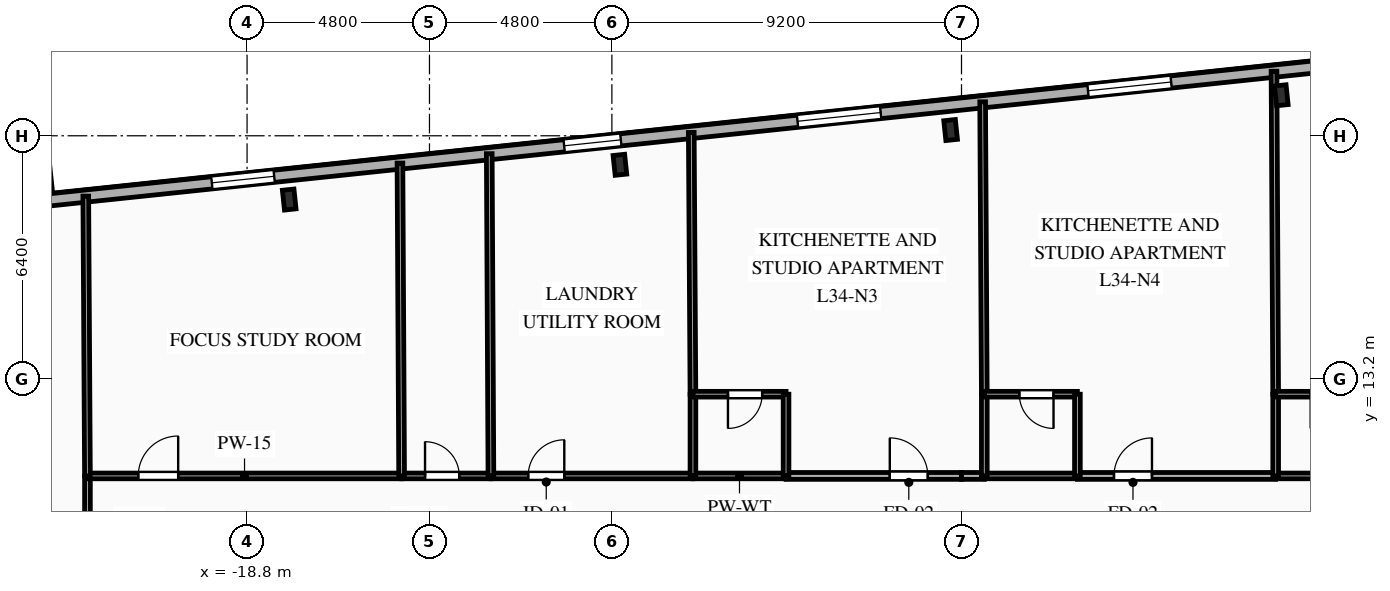
"""IFC4 building model, lengths in metres.
Left out: names, types, materials, properties, quantities, classifications, styles, units other than length and angle.
Written with IfcOpenShell. Run it as: python <this file> out.ifc"""

import sys

from ifc_helpers import new_model, si_unit, direction, frame, frame_2d, origin, origin_2d, place, context, subcontext, project, spatial, rectangle, i_section, extrude, element, fill, save


model = new_model("IFC4")
c1 = context("Model", 3, precision=1e-05, world=origin(), true_north=direction((0.0, 1.0)))
c2 = subcontext(c1, "Body", "Model", "MODEL_VIEW")
j1 = project(units=[si_unit("LENGTHUNIT", "METRE"), si_unit("PLANEANGLEUNIT", "RADIAN")], contexts=[c1])
p1 = place(None, origin())
s1 = spatial("IfcSite", under=j1, at=p1, CompositionType="ELEMENT")
p2 = place(p1, origin())
s2 = spatial("IfcBuilding", under=s1, at=p2, CompositionType="ELEMENT")
p3 = place(p2, frame((0.0, 0.0, 122.55)))
s3 = spatial("IfcBuildingStorey", under=s2, at=p3, CompositionType="ELEMENT", Elevation=122.55)
for number, where, z_axis, x_axis in (
    (1, (8.415, 20.666, 0.0), (0.0, 0.0, 1.0), (0.995, 0.105, 0.0)),
    (2, (-0.287, 19.751, 0.0), (0.0, 0.0, 1.0), (0.995, 0.105, 0.0)),
    (3, (-8.989, 18.836, 0.0), (0.0, 0.0, 1.0), (0.995, 0.105, 0.0)),
    (4, (-17.691, 17.922, 0.0), (0.0, 0.0, 1.0), (0.995, 0.105, 0.0)),
):
    element("IfcColumn", number, at=place(p3, frame(where, z_axis=z_axis, x_axis=x_axis)), inside=s3, PredefinedType="COLUMN", context=c2, shape_type="SweptSolid", body=[
        extrude(i_section(OverallWidth=0.306, OverallDepth=0.524, WebThickness=0.021, FlangeThickness=0.04, FilletRadius=0.027, at=origin_2d()), origin(), (0.0, 0.0, 1.0), 3.35),
    ])
p4 = place(p3, frame((-27.107, 17.586, 0.0), z_axis=(0.0, 0.0, 1.0), x_axis=(0.994521628355, 0.104531003701, 0.0)))
e5 = element("IfcWall", 5, at=p4, inside=s3, PredefinedType="SOLIDWALL", context=c2, shape_type="SweptSolid", body=[
    extrude(rectangle(XDim=53.8, YDim=0.32, at=frame_2d((26.9, 0.0))), origin(), (0.0, 0.0, 1.0), 3.0),
])
p5 = place(p4, frame((1.457, 0.0, 0.85)))
e6 = element("IfcOpeningElement", 6, at=p5, cuts=e5, PredefinedType="OPENING", context=c2, shape_type="SweptSolid", body=[
    extrude(rectangle(XDim=1.65, YDim=1.85, at=frame_2d((0.825, 0.925))), frame((0.0, 0.17, 0.0), z_axis=(0.0, -1.0, 0.0), x_axis=(1.0, 0.0, 0.0)), (0.0, 0.0, 1.0), 0.34),
])
p6 = place(p4, frame((7.421, 0.0, 0.85)))
e7 = element("IfcOpeningElement", 7, at=p6, cuts=e5, PredefinedType="OPENING", context=c2, shape_type="SweptSolid", body=[
    extrude(rectangle(XDim=1.65, YDim=1.85, at=frame_2d((0.825, 0.925))), frame((0.0, 0.17, 0.0), z_axis=(0.0, -1.0, 0.0), x_axis=(1.0, 0.0, 0.0)), (0.0, 0.0, 1.0), 0.34),
])
p7 = place(p4, frame((16.743, 0.0, 0.85)))
e8 = element("IfcOpeningElement", 8, at=p7, cuts=e5, PredefinedType="OPENING", context=c2, shape_type="SweptSolid", body=[
    extrude(rectangle(XDim=1.5, YDim=1.85, at=frame_2d((0.75, 0.925))), frame((0.0, 0.17, 0.0), z_axis=(0.0, -1.0, 0.0), x_axis=(1.0, 0.0, 0.0)), (0.0, 0.0, 1.0), 0.34),
])
p8 = place(p4, frame((22.918, 0.0, 0.85)))
e9 = element("IfcOpeningElement", 9, at=p8, cuts=e5, PredefinedType="OPENING", context=c2, shape_type="SweptSolid", body=[
    extrude(rectangle(XDim=2.2, YDim=1.85, at=frame_2d((1.1, 0.925))), frame((0.0, 0.17, 0.0), z_axis=(0.0, -1.0, 0.0), x_axis=(1.0, 0.0, 0.0)), (0.0, 0.0, 1.0), 0.34),
])
p9 = place(p4, frame((30.604, 0.0, 0.85)))
e10 = element("IfcOpeningElement", 10, at=p9, cuts=e5, PredefinedType="OPENING", context=c2, shape_type="SweptSolid", body=[
    extrude(rectangle(XDim=2.2, YDim=1.85, at=frame_2d((1.1, 0.925))), frame((0.0, 0.17, 0.0), z_axis=(0.0, -1.0, 0.0), x_axis=(1.0, 0.0, 0.0)), (0.0, 0.0, 1.0), 0.34),
])
p10 = place(p4, frame((38.289, 0.0, 0.85)))
e11 = element("IfcOpeningElement", 11, at=p10, cuts=e5, PredefinedType="OPENING", context=c2, shape_type="SweptSolid", body=[
    extrude(rectangle(XDim=2.2, YDim=1.85, at=frame_2d((1.1, 0.925))), frame((0.0, 0.17, 0.0), z_axis=(0.0, -1.0, 0.0), x_axis=(1.0, 0.0, 0.0)), (0.0, 0.0, 1.0), 0.34),
])
p11 = place(p4, frame((44.208, 0.0, 0.85)))
e12 = element("IfcOpeningElement", 12, at=p11, cuts=e5, PredefinedType="OPENING", context=c2, shape_type="SweptSolid", body=[
    extrude(rectangle(XDim=1.65, YDim=1.85, at=frame_2d((0.825, 0.925))), frame((0.0, 0.17, 0.0), z_axis=(0.0, -1.0, 0.0), x_axis=(1.0, 0.0, 0.0)), (0.0, 0.0, 1.0), 0.34),
])
p12 = place(p4, frame((47.771, 0.0, 0.85)))
e13 = element("IfcOpeningElement", 13, at=p12, cuts=e5, PredefinedType="OPENING", context=c2, shape_type="SweptSolid", body=[
    extrude(rectangle(XDim=1.65, YDim=1.85, at=frame_2d((0.825, 0.925))), frame((0.0, 0.17, 0.0), z_axis=(0.0, -1.0, 0.0), x_axis=(1.0, 0.0, 0.0)), (0.0, 0.0, 1.0), 0.34),
])
p13 = place(p4, frame((51.129, 0.0, 0.85)))
e14 = element("IfcOpeningElement", 14, at=p13, cuts=e5, PredefinedType="OPENING", context=c2, shape_type="SweptSolid", body=[
    extrude(rectangle(XDim=1.5, YDim=1.85, at=frame_2d((0.75, 0.925))), frame((0.0, 0.17, 0.0), z_axis=(0.0, -1.0, 0.0), x_axis=(1.0, 0.0, 0.0)), (0.0, 0.0, 1.0), 0.34),
])
p14 = place(p3, frame((-23.0, 8.5, 0.0), z_axis=(0.0, 0.0, 1.0), x_axis=(0.0, 1.0, 0.0)))
e15 = element("IfcWall", 15, at=p14, inside=s3, PredefinedType="PARTITIONING", context=c2, shape_type="SweptSolid", body=[
    extrude(rectangle(XDim=2.15, YDim=0.15, at=frame_2d((1.075, 0.0))), origin(), (0.0, 0.0, 1.0), 3.0),
])
p15 = place(p3, frame((-23.0, 10.65, 0.0), z_axis=(0.0, 0.0, 1.0), x_axis=(1.0, 0.0, 0.0)))
e16 = element("IfcWall", 16, at=p15, inside=s3, PredefinedType="PARTITIONING", context=c2, shape_type="SweptSolid", body=[
    extrude(rectangle(XDim=8.267, YDim=0.15, at=frame_2d((4.134, 0.0))), origin(), (0.0, 0.0, 1.0), 3.0),
])
p16 = place(p15, frame((1.337, 0.0, 0.0)))
e17 = element("IfcOpeningElement", 17, at=p16, cuts=e16, PredefinedType="OPENING", context=c2, shape_type="SweptSolid", body=[
    extrude(rectangle(XDim=1.05, YDim=2.15, at=frame_2d((0.525, 1.075))), frame((0.0, 0.085, 0.0), z_axis=(0.0, -1.0, 0.0), x_axis=(1.0, 0.0, 0.0)), (0.0, 0.0, 1.0), 0.17),
])
p17 = place(p3, frame((-14.733, 10.65, 0.0), z_axis=(0.0, 0.0, 1.0), x_axis=(1.0, 0.0, 0.0)))
e18 = element("IfcWall", 18, at=p17, inside=s3, PredefinedType="PLUMBINGWALL", context=c2, shape_type="SweptSolid", body=[
    extrude(rectangle(XDim=2.35, YDim=0.15, at=frame_2d((1.175, 0.0))), origin(), (0.0, 0.0, 1.0), 3.0),
])
p18 = place(p17, frame((0.616, 0.0, 0.0)))
e19 = element("IfcOpeningElement", 19, at=p18, cuts=e18, PredefinedType="OPENING", context=c2, shape_type="SweptSolid", body=[
    extrude(rectangle(XDim=0.9, YDim=2.1, at=frame_2d((0.45, 1.05))), frame((0.0, 0.085, 0.0), z_axis=(0.0, -1.0, 0.0), x_axis=(1.0, 0.0, 0.0)), (0.0, 0.0, 1.0), 0.17),
])
p19 = place(p3, frame((-12.383, 10.65, 0.0), z_axis=(0.0, 0.0, 1.0), x_axis=(1.0, 0.0, 0.0)))
e20 = element("IfcWall", 20, at=p19, inside=s3, PredefinedType="PARTITIONING", context=c2, shape_type="SweptSolid", body=[
    extrude(rectangle(XDim=5.316, YDim=0.15, at=frame_2d((2.658, 0.0))), origin(), (0.0, 0.0, 1.0), 3.0),
])
p20 = place(p19, frame((0.981, 0.0, 0.0)))
e21 = element("IfcOpeningElement", 21, at=p20, cuts=e20, PredefinedType="OPENING", context=c2, shape_type="SweptSolid", body=[
    extrude(rectangle(XDim=0.95, YDim=2.1, at=frame_2d((0.475, 1.05))), frame((0.0, 0.085, 0.0), z_axis=(0.0, -1.0, 0.0), x_axis=(1.0, 0.0, 0.0)), (0.0, 0.0, 1.0), 0.17),
])
p21 = place(p3, frame((-4.617, 10.65, 0.0), z_axis=(0.0, 0.0, 1.0), x_axis=(1.0, 0.0, 0.0)))
e22 = element("IfcWall", 22, at=p21, inside=s3, PredefinedType="PARTITIONING", context=c2, shape_type="SweptSolid", body=[
    extrude(rectangle(XDim=4.617, YDim=0.18, at=frame_2d((2.309, 0.0))), origin(), (0.0, 0.0, 1.0), 3.0),
])
p22 = place(p21, frame((2.73, 0.0, 0.0)))
e23 = element("IfcOpeningElement", 23, at=p22, cuts=e22, PredefinedType="OPENING", context=c2, shape_type="SweptSolid", body=[
    extrude(rectangle(XDim=1.0, YDim=2.15, at=frame_2d((0.5, 1.075))), frame((0.0, 0.1, 0.0), z_axis=(0.0, -1.0, 0.0), x_axis=(1.0, 0.0, 0.0)), (0.0, 0.0, 1.0), 0.2),
])
p23 = place(p3, frame((-7.067, 10.65, 0.0), z_axis=(0.0, 0.0, 1.0), x_axis=(1.0, 0.0, 0.0)))
e24 = element("IfcWall", 24, at=p23, inside=s3, PredefinedType="PLUMBINGWALL", context=c2, shape_type="SweptSolid", body=[
    extrude(rectangle(XDim=2.45, YDim=0.15, at=frame_2d((1.225, 0.0))), origin(), (0.0, 0.0, 1.0), 3.0),
])
p24 = place(p3, frame((0.0, 10.65, 0.0), z_axis=(0.0, 0.0, 1.0), x_axis=(1.0, 0.0, 0.0)))
e25 = element("IfcWall", 25, at=p24, inside=s3, PredefinedType="PARTITIONING", context=c2, shape_type="SweptSolid", body=[
    extrude(rectangle(XDim=0.6, YDim=0.18, at=frame_2d((0.3, 0.0))), origin(), (0.0, 0.0, 1.0), 3.0),
])
p25 = place(p3, frame((3.05, 10.65, 0.0), z_axis=(0.0, 0.0, 1.0), x_axis=(1.0, 0.0, 0.0)))
e26 = element("IfcWall", 26, at=p25, inside=s3, PredefinedType="PARTITIONING", context=c2, shape_type="SweptSolid", body=[
    extrude(rectangle(XDim=5.217, YDim=0.18, at=frame_2d((2.608, 0.0))), origin(), (0.0, 0.0, 1.0), 3.0),
])
p26 = place(p25, frame((0.962, 0.0, 0.0)))
e27 = element("IfcOpeningElement", 27, at=p26, cuts=e26, PredefinedType="OPENING", context=c2, shape_type="SweptSolid", body=[
    extrude(rectangle(XDim=1.0, YDim=2.15, at=frame_2d((0.5, 1.075))), frame((0.0, 0.1, 0.0), z_axis=(0.0, -1.0, 0.0), x_axis=(1.0, 0.0, 0.0)), (0.0, 0.0, 1.0), 0.2),
])
for number, where, z_axis, x_axis in (
    (28, (0.6, 10.65, 0.0), (0.0, 0.0, 1.0), (1.0, 0.0, 0.0)),
    (29, (8.267, 10.65, 0.0), (0.0, 0.0, 1.0), (1.0, 0.0, 0.0)),
):
    element("IfcWall", number, at=place(p3, frame(where, z_axis=z_axis, x_axis=x_axis)), inside=s3, PredefinedType="PLUMBINGWALL", context=c2, shape_type="SweptSolid", body=[
        extrude(rectangle(XDim=2.45, YDim=0.15, at=frame_2d((1.225, 0.0))), origin(), (0.0, 0.0, 1.0), 3.0),
    ])
p27 = place(p3, frame((-23.044, 18.013, 0.0), z_axis=(0.0, 0.0, 1.0), x_axis=(0.005968459246, -0.999982188588, 0.0)))
e30 = element("IfcWall", 30, at=p27, inside=s3, PredefinedType="PARTITIONING", context=c2, shape_type="SweptSolid", body=[
    extrude(rectangle(XDim=7.363, YDim=0.15, at=frame_2d((3.682, 0.0))), origin(), (0.0, 0.0, 1.0), 3.0),
])
p28 = place(p3, frame((-14.777, 18.882, 0.0), z_axis=(0.0, 0.0, 1.0), x_axis=(0.005338477179, -0.999985750229, 0.0)))
e31 = element("IfcWall", 31, at=p28, inside=s3, PredefinedType="PLUMBINGWALL", context=c2, shape_type="SweptSolid", body=[
    extrude(rectangle(XDim=8.232, YDim=0.15, at=frame_2d((4.116, 0.0))), origin(), (0.0, 0.0, 1.0), 3.0),
])
p29 = place(p3, frame((-12.427, 19.129, 0.0), z_axis=(0.0, 0.0, 1.0), x_axis=(0.005182918666, -0.999986568587, 0.0)))
e32 = element("IfcWall", 32, at=p29, inside=s3, PredefinedType="PLUMBINGWALL", context=c2, shape_type="SweptSolid", body=[
    extrude(rectangle(XDim=8.479, YDim=0.15, at=frame_2d((4.239, 0.0))), origin(), (0.0, 0.0, 1.0), 3.0),
])
p30 = place(p3, frame((-7.111, 19.688, 0.0), z_axis=(0.0, 0.0, 1.0), x_axis=(0.006380360007, -0.999979645296, 0.0)))
e33 = element("IfcWall", 33, at=p30, inside=s3, PredefinedType="PARTITIONING", context=c2, shape_type="SweptSolid", body=[
    extrude(rectangle(XDim=6.888, YDim=0.15, at=frame_2d((3.444, 0.0))), origin(), (0.0, 0.0, 1.0), 3.0),
])
p31 = place(p3, frame((-7.067, 12.8, 0.0), z_axis=(0.0, 0.0, 1.0), x_axis=(0.0, -1.0, 0.0)))
e34 = element("IfcWall", 34, at=p31, inside=s3, PredefinedType="PLUMBINGWALL", context=c2, shape_type="SweptSolid", body=[
    extrude(rectangle(XDim=2.15, YDim=0.15, at=frame_2d((1.075, 0.0))), origin(), (0.0, 0.0, 1.0), 3.0),
])
p32 = place(p3, frame((-4.617, 12.8, 0.0), z_axis=(0.0, 0.0, 1.0), x_axis=(-1.0, 0.0, 0.0)))
e35 = element("IfcWall", 35, at=p32, inside=s3, PredefinedType="PLUMBINGWALL", context=c2, shape_type="SweptSolid", body=[
    extrude(rectangle(XDim=2.45, YDim=0.15, at=frame_2d((1.225, 0.0))), origin(), (0.0, 0.0, 1.0), 3.0),
])
p33 = place(p32, frame((0.629, 0.0, 0.0)))
e36 = element("IfcOpeningElement", 36, at=p33, cuts=e35, PredefinedType="OPENING", context=c2, shape_type="SweptSolid", body=[
    extrude(rectangle(XDim=0.9, YDim=2.1, at=frame_2d((0.45, 1.05))), frame((0.0, 0.085, 0.0), z_axis=(0.0, -1.0, 0.0), x_axis=(1.0, 0.0, 0.0)), (0.0, 0.0, 1.0), 0.17),
])
p34 = place(p3, frame((-4.617, 10.65, 0.0), z_axis=(0.0, 0.0, 1.0), x_axis=(0.0, 1.0, 0.0)))
e37 = element("IfcWall", 37, at=p34, inside=s3, PredefinedType="PLUMBINGWALL", context=c2, shape_type="SweptSolid", body=[
    extrude(rectangle(XDim=2.15, YDim=0.15, at=frame_2d((1.075, 0.0))), origin(), (0.0, 0.0, 1.0), 3.0),
])
p35 = place(p3, frame((0.556, 20.493, 0.0), z_axis=(0.0, 0.0, 1.0), x_axis=(0.005712016487, -0.999983686301, 0.0)))
e38 = element("IfcWall", 38, at=p35, inside=s3, PredefinedType="PARTITIONING", context=c2, shape_type="SweptSolid", body=[
    extrude(rectangle(XDim=7.694, YDim=0.15, at=frame_2d((3.847, 0.0))), origin(), (0.0, 0.0, 1.0), 3.0),
])
p36 = place(p3, frame((0.6, 12.8, 0.0), z_axis=(0.0, 0.0, 1.0), x_axis=(0.0, -1.0, 0.0)))
e39 = element("IfcWall", 39, at=p36, inside=s3, PredefinedType="PLUMBINGWALL", context=c2, shape_type="SweptSolid", body=[
    extrude(rectangle(XDim=2.15, YDim=0.15, at=frame_2d((1.075, 0.0))), origin(), (0.0, 0.0, 1.0), 3.0),
])
p37 = place(p3, frame((3.05, 12.8, 0.0), z_axis=(0.0, 0.0, 1.0), x_axis=(-1.0, 0.0, 0.0)))
e40 = element("IfcWall", 40, at=p37, inside=s3, PredefinedType="PLUMBINGWALL", context=c2, shape_type="SweptSolid", body=[
    extrude(rectangle(XDim=2.45, YDim=0.15, at=frame_2d((1.225, 0.0))), origin(), (0.0, 0.0, 1.0), 3.0),
])
p38 = place(p37, frame((0.629, 0.0, 0.0)))
e41 = element("IfcOpeningElement", 41, at=p38, cuts=e40, PredefinedType="OPENING", context=c2, shape_type="SweptSolid", body=[
    extrude(rectangle(XDim=0.9, YDim=2.1, at=frame_2d((0.45, 1.05))), frame((0.0, 0.085, 0.0), z_axis=(0.0, -1.0, 0.0), x_axis=(1.0, 0.0, 0.0)), (0.0, 0.0, 1.0), 0.17),
])
p39 = place(p3, frame((3.05, 10.65, 0.0), z_axis=(0.0, 0.0, 1.0), x_axis=(0.0, 1.0, 0.0)))
e42 = element("IfcWall", 42, at=p39, inside=s3, PredefinedType="PLUMBINGWALL", context=c2, shape_type="SweptSolid", body=[
    extrude(rectangle(XDim=2.15, YDim=0.15, at=frame_2d((1.075, 0.0))), origin(), (0.0, 0.0, 1.0), 3.0),
])
p40 = place(p3, frame((8.223, 21.299, 0.0), z_axis=(0.0, 0.0, 1.0), x_axis=(0.005170561699, -0.999986632557, 0.0)))
e43 = element("IfcWall", 43, at=p40, inside=s3, PredefinedType="PARTITIONING", context=c2, shape_type="SweptSolid", body=[
    extrude(rectangle(XDim=8.499, YDim=0.15, at=frame_2d((4.25, 0.0))), origin(), (0.0, 0.0, 1.0), 2.485),
])
p41 = place(p3, frame((8.267, 12.8, 0.0), z_axis=(0.0, 0.0, 1.0), x_axis=(0.0, -1.0, 0.0)))
e44 = element("IfcWall", 44, at=p41, inside=s3, PredefinedType="PLUMBINGWALL", context=c2, shape_type="SweptSolid", body=[
    extrude(rectangle(XDim=2.15, YDim=0.15, at=frame_2d((1.075, 0.0))), origin(), (0.0, 0.0, 1.0), 3.0),
])
p42 = place(p3, frame((10.717, 12.8, 0.0), z_axis=(0.0, 0.0, 1.0), x_axis=(-1.0, 0.0, 0.0)))
e45 = element("IfcWall", 45, at=p42, inside=s3, PredefinedType="PLUMBINGWALL", context=c2, shape_type="SweptSolid", body=[
    extrude(rectangle(XDim=2.45, YDim=0.15, at=frame_2d((1.225, 0.0))), origin(), (0.0, 0.0, 1.0), 3.0),
])
p43 = place(p42, frame((0.629, 0.0, 0.0)))
e46 = element("IfcOpeningElement", 46, at=p43, cuts=e45, PredefinedType="OPENING", context=c2, shape_type="SweptSolid", body=[
    extrude(rectangle(XDim=0.9, YDim=2.1, at=frame_2d((0.45, 1.05))), frame((0.0, 0.085, 0.0), z_axis=(0.0, -1.0, 0.0), x_axis=(1.0, 0.0, 0.0)), (0.0, 0.0, 1.0), 0.17),
])
p44 = place(p6, origin())
e47 = element("IfcWindow", 47, at=p44, inside=s3, PartitioningType="SINGLE_PANEL", PredefinedType="WINDOW", context=c2, shape_type="SweptSolid", body=[
    extrude(rectangle(XDim=1.65, YDim=1.85, at=frame_2d((0.825, 0.925))), frame((0.0, 0.03, 0.0), z_axis=(0.0, -1.0, 0.0), x_axis=(1.0, 0.0, 0.0)), (0.0, 0.0, 1.0), 0.06),
])
fill(e7, e47)
p45 = place(p7, origin())
e48 = element("IfcWindow", 48, at=p45, inside=s3, PartitioningType="SINGLE_PANEL", PredefinedType="WINDOW", context=c2, shape_type="SweptSolid", body=[
    extrude(rectangle(XDim=1.5, YDim=1.85, at=frame_2d((0.75, 0.925))), frame((0.0, 0.03, 0.0), z_axis=(0.0, -1.0, 0.0), x_axis=(1.0, 0.0, 0.0)), (0.0, 0.0, 1.0), 0.06),
])
fill(e8, e48)
p46 = place(p8, origin())
e49 = element("IfcWindow", 49, at=p46, inside=s3, PartitioningType="SINGLE_PANEL", PredefinedType="WINDOW", context=c2, shape_type="SweptSolid", body=[
    extrude(rectangle(XDim=2.2, YDim=1.85, at=frame_2d((1.1, 0.925))), frame((0.0, 0.03, 0.0), z_axis=(0.0, -1.0, 0.0), x_axis=(1.0, 0.0, 0.0)), (0.0, 0.0, 1.0), 0.06),
])
fill(e9, e49)
p47 = place(p9, origin())
e50 = element("IfcWindow", 50, at=p47, inside=s3, PartitioningType="SINGLE_PANEL", PredefinedType="WINDOW", context=c2, shape_type="SweptSolid", body=[
    extrude(rectangle(XDim=2.2, YDim=1.85, at=frame_2d((1.1, 0.925))), frame((0.0, 0.03, 0.0), z_axis=(0.0, -1.0, 0.0), x_axis=(1.0, 0.0, 0.0)), (0.0, 0.0, 1.0), 0.06),
])
fill(e10, e50)
p48 = place(p16, origin())
e51 = element("IfcDoor", 51, at=p48, inside=s3, OperationType="SINGLE_SWING_RIGHT", PredefinedType="DOOR", context=c2, shape_type="SweptSolid", body=[
    extrude(rectangle(XDim=1.05, YDim=2.15, at=frame_2d((0.525, 1.075))), frame((0.0, 0.025, 0.0), z_axis=(0.0, -1.0, 0.0), x_axis=(1.0, 0.0, 0.0)), (0.0, 0.0, 1.0), 0.05),
])
fill(e17, e51)
p49 = place(p18, origin())
e52 = element("IfcDoor", 52, at=p49, inside=s3, OperationType="SINGLE_SWING_LEFT", PredefinedType="DOOR", context=c2, shape_type="SweptSolid", body=[
    extrude(rectangle(XDim=0.9, YDim=2.1, at=frame_2d((0.45, 1.05))), frame((0.0, 0.025, 0.0), z_axis=(0.0, -1.0, 0.0), x_axis=(1.0, 0.0, 0.0)), (0.0, 0.0, 1.0), 0.05),
])
fill(e19, e52)
p50 = place(p20, origin())
e53 = element("IfcDoor", 53, at=p50, inside=s3, OperationType="SINGLE_SWING_RIGHT", PredefinedType="DOOR", context=c2, shape_type="SweptSolid", body=[
    extrude(rectangle(XDim=0.95, YDim=2.1, at=frame_2d((0.475, 1.05))), frame((0.0, 0.025, 0.0), z_axis=(0.0, -1.0, 0.0), x_axis=(1.0, 0.0, 0.0)), (0.0, 0.0, 1.0), 0.05),
])
fill(e21, e53)
p51 = place(p22, origin())
e54 = element("IfcDoor", 54, at=p51, inside=s3, OperationType="SINGLE_SWING_LEFT", PredefinedType="DOOR", context=c2, shape_type="SweptSolid", body=[
    extrude(rectangle(XDim=1.0, YDim=2.15, at=frame_2d((0.5, 1.075))), frame((0.0, 0.025, 0.0), z_axis=(0.0, -1.0, 0.0), x_axis=(1.0, 0.0, 0.0)), (0.0, 0.0, 1.0), 0.05),
])
fill(e23, e54)
p52 = place(p26, origin())
e55 = element("IfcDoor", 55, at=p52, inside=s3, OperationType="SINGLE_SWING_RIGHT", PredefinedType="DOOR", context=c2, shape_type="SweptSolid", body=[
    extrude(rectangle(XDim=1.0, YDim=2.15, at=frame_2d((0.5, 1.075))), frame((0.0, 0.025, 0.0), z_axis=(0.0, -1.0, 0.0), x_axis=(1.0, 0.0, 0.0)), (0.0, 0.0, 1.0), 0.05),
])
fill(e27, e55)
p53 = place(p33, origin())
e56 = element("IfcDoor", 56, at=p53, inside=s3, OperationType="SINGLE_SWING_RIGHT", PredefinedType="DOOR", context=c2, shape_type="SweptSolid", body=[
    extrude(rectangle(XDim=0.9, YDim=2.1, at=frame_2d((0.45, 1.05))), frame((0.0, 0.025, 0.0), z_axis=(0.0, -1.0, 0.0), x_axis=(1.0, 0.0, 0.0)), (0.0, 0.0, 1.0), 0.05),
])
fill(e36, e56)
p54 = place(p38, origin())
e57 = element("IfcDoor", 57, at=p54, inside=s3, OperationType="SINGLE_SWING_LEFT", PredefinedType="DOOR", context=c2, shape_type="SweptSolid", body=[
    extrude(rectangle(XDim=0.9, YDim=2.1, at=frame_2d((0.45, 1.05))), frame((0.0, 0.025, 0.0), z_axis=(0.0, -1.0, 0.0), x_axis=(1.0, 0.0, 0.0)), (0.0, 0.0, 1.0), 0.05),
])
fill(e41, e57)
p55 = place(p43, origin())
e58 = element("IfcDoor", 58, at=p55, inside=s3, OperationType="SINGLE_SWING_RIGHT", PredefinedType="DOOR", context=c2, shape_type="SweptSolid", body=[
    extrude(rectangle(XDim=0.9, YDim=2.1, at=frame_2d((0.45, 1.05))), frame((0.0, 0.025, 0.0), z_axis=(0.0, -1.0, 0.0), x_axis=(1.0, 0.0, 0.0)), (0.0, 0.0, 1.0), 0.05),
])
fill(e46, e58)
save(model, sys.argv[1])
